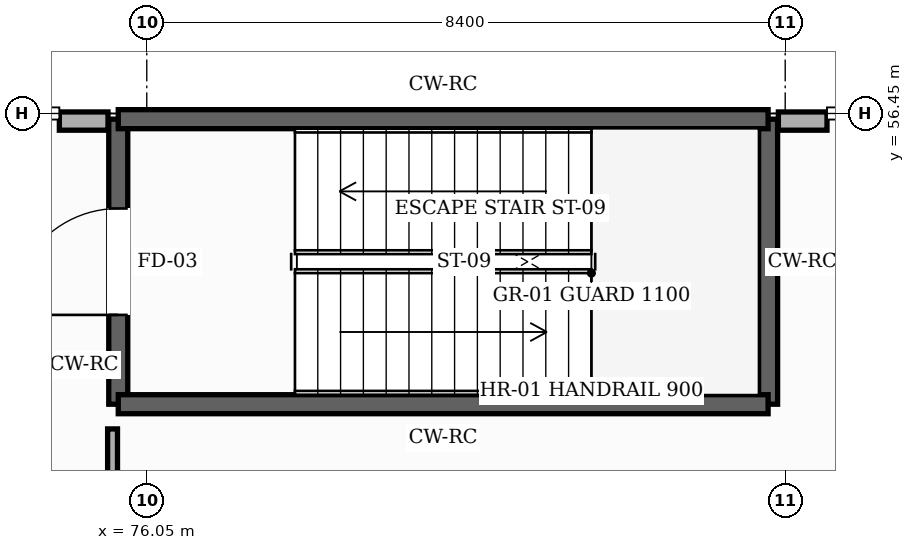
"""IFC4 building model, lengths in metres.
Left out: names, types, materials, properties, quantities, classifications, styles, units other than length and angle.
Written with IfcOpenShell. Run it as: python <this file> out.ifc"""

import sys

from ifc_helpers import new_model, si_unit, direction, frame, frame_2d, origin, place, context, subcontext, project, spatial, rectangle, extrude, element, fill, save


model = new_model("IFC4")
c1 = context("Model", 3, precision=1e-05, world=origin(), true_north=direction((0.0, 1.0)))
c2 = subcontext(c1, "Body", "Model", "MODEL_VIEW")
j1 = project(units=[si_unit("LENGTHUNIT", "METRE"), si_unit("PLANEANGLEUNIT", "RADIAN")], contexts=[c1])
p1 = place(None, origin())
s1 = spatial("IfcSite", under=j1, at=p1, CompositionType="ELEMENT")
p2 = place(p1, origin())
s2 = spatial("IfcBuilding", under=s1, at=p2, CompositionType="ELEMENT")
p3 = place(p2, frame((0.0, 0.0, 15.0)))
s3 = spatial("IfcBuildingStorey", under=s2, at=p3, CompositionType="ELEMENT", Elevation=15.0)
p4 = place(p3, frame((74.9, 56.35, 0.0), z_axis=(0.0, 0.0, 1.0), x_axis=(1.0, 0.0, 0.0)))
e1 = element("IfcWall", 1, at=p4, inside=s3, PredefinedType="SOLIDWALL", context=c2, shape_type="SweptSolid", body=[
    extrude(rectangle(XDim=0.64, YDim=0.24, at=frame_2d((0.32, 0.0))), origin(), (0.0, 0.0, 1.0), 3.135),
])
p5 = place(p3, frame((84.36, 56.35, 0.0), z_axis=(0.0, 0.0, 1.0), x_axis=(1.0, 0.0, 0.0)))
e2 = element("IfcWall", 2, at=p5, inside=s3, PredefinedType="SOLIDWALL", context=c2, shape_type="SweptSolid", body=[
    extrude(rectangle(XDim=0.64, YDim=0.24, at=frame_2d((0.32, 0.0))), origin(), (0.0, 0.0, 1.0), 3.135),
])
p6 = place(p3, frame((75.675, 52.625, 0.0), z_axis=(0.0, 0.0, 1.0), x_axis=(0.0, 1.0, 0.0)))
e3 = element("IfcWall", 3, at=p6, inside=s3, PredefinedType="SHEAR", context=c2, shape_type="SweptSolid", body=[
    extrude(rectangle(XDim=3.75, YDim=0.25, at=frame_2d((1.875, 0.0))), origin(), (0.0, 0.0, 1.0), 4.56),
])
p7 = place(p6, frame((1.175, 0.0, 0.0)))
e4 = element("IfcOpeningElement", 4, at=p7, cuts=e3, PredefinedType="OPENING", context=c2, shape_type="SweptSolid", body=[
    extrude(rectangle(XDim=1.4, YDim=2.25, at=frame_2d((0.7, 1.125))), frame((0.0, 0.135, 0.0), z_axis=(0.0, -1.0, 0.0), x_axis=(1.0, 0.0, 0.0)), (0.0, 0.0, 1.0), 0.27),
])
p8 = place(p3, frame((84.225, 56.375, 0.0), z_axis=(0.0, 0.0, 1.0), x_axis=(0.0, -1.0, 0.0)))
e5 = element("IfcWall", 5, at=p8, inside=s3, PredefinedType="SHEAR", context=c2, shape_type="SweptSolid", body=[
    extrude(rectangle(XDim=3.75, YDim=0.25, at=frame_2d((1.875, 0.0))), origin(), (0.0, 0.0, 1.0), 4.56),
])
for number, where, z_axis, x_axis in (
    (6, (84.225, 52.625, 0.0), (0.0, 0.0, 1.0), (-1.0, 0.0, 0.0)),
    (7, (75.675, 56.375, 0.0), (0.0, 0.0, 1.0), (1.0, 0.0, 0.0)),
):
    element("IfcWall", number, at=place(p3, frame(where, z_axis=z_axis, x_axis=x_axis)), inside=s3, PredefinedType="SHEAR", context=c2, shape_type="SweptSolid", body=[
        extrude(rectangle(XDim=8.55, YDim=0.25, at=frame_2d((4.275, 0.0))), origin(), (0.0, 0.0, 1.0), 4.56),
    ])
p9 = place(p3, frame((75.6, 16.6, 0.0), z_axis=(0.0, 0.0, 1.0), x_axis=(0.0, 1.0, 0.0)))
e8 = element("IfcWall", 8, at=p9, inside=s3, PredefinedType="PARTITIONING", context=c2, shape_type="SweptSolid", body=[
    extrude(rectangle(XDim=35.7, YDim=0.13, at=frame_2d((17.85, 0.0))), origin(), (0.0, 0.0, 1.0), 4.545),
])
p10 = place(p9, frame((5.2, 0.0, 0.0)))
e9 = element("IfcOpeningElement", 9, at=p10, cuts=e8, PredefinedType="OPENING", context=c2, shape_type="SweptSolid", body=[
    extrude(rectangle(XDim=1.5, YDim=2.3, at=frame_2d((0.75, 1.15))), frame((0.0, 0.075, 0.0), z_axis=(0.0, -1.0, 0.0), x_axis=(1.0, 0.0, 0.0)), (0.0, 0.0, 1.0), 0.15),
])
p11 = place(p9, frame((17.025, 0.0, 0.0)))
e10 = element("IfcOpeningElement", 10, at=p11, cuts=e8, PredefinedType="OPENING", context=c2, shape_type="SweptSolid", body=[
    extrude(rectangle(XDim=1.65, YDim=2.35, at=frame_2d((0.825, 1.175))), frame((0.0, 0.075, 0.0), z_axis=(0.0, -1.0, 0.0), x_axis=(1.0, 0.0, 0.0)), (0.0, 0.0, 1.0), 0.15),
])
p12 = place(p9, frame((29.0, 0.0, 0.0)))
e11 = element("IfcOpeningElement", 11, at=p12, cuts=e8, PredefinedType="OPENING", context=c2, shape_type="SweptSolid", body=[
    extrude(rectangle(XDim=1.5, YDim=2.3, at=frame_2d((0.75, 1.15))), frame((0.0, 0.075, 0.0), z_axis=(0.0, -1.0, 0.0), x_axis=(1.0, 0.0, 0.0)), (0.0, 0.0, 1.0), 0.15),
])
p13 = place(p7, origin())
e12 = element("IfcDoor", 12, at=p13, inside=s3, OperationType="SINGLE_SWING_LEFT", PredefinedType="DOOR", context=c2, shape_type="SweptSolid", body=[
    extrude(rectangle(XDim=1.4, YDim=2.25, at=frame_2d((0.7, 1.125))), frame((0.0, 0.025, 0.0), z_axis=(0.0, -1.0, 0.0), x_axis=(1.0, 0.0, 0.0)), (0.0, 0.0, 1.0), 0.05),
])
fill(e4, e12)
save(model, sys.argv[1])
